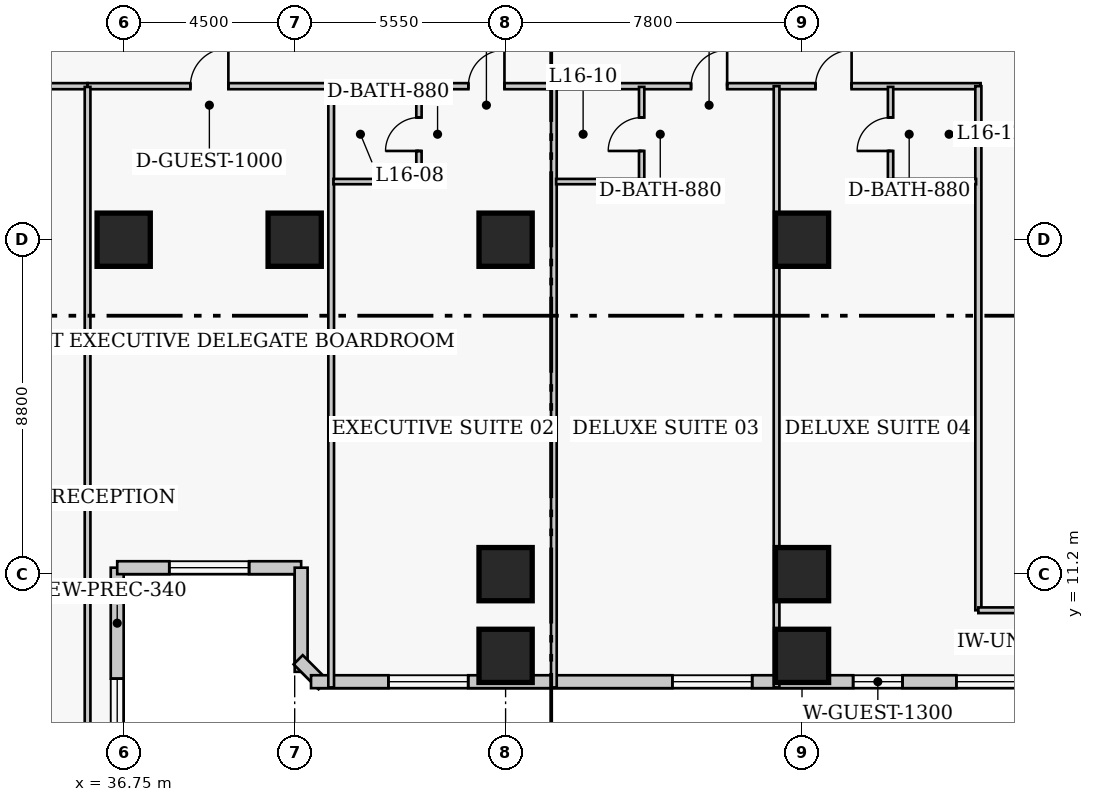
"""IFC4 building model, lengths in metres.
Left out: names, types, materials, properties, quantities, classifications, styles, units other than length and angle.
Written with IfcOpenShell. Run it as: python <this file> out.ifc"""

import sys

from ifc_helpers import new_model, si_unit, direction, frame, frame_2d, origin, origin_2d, place, context, subcontext, project, spatial, rectangle, extrude, element, fill, save


model = new_model("IFC4")
c1 = context("Model", 3, precision=1e-05, world=origin(), true_north=direction((0.0, 1.0)))
c2 = subcontext(c1, "Body", "Model", "MODEL_VIEW")
j1 = project(units=[si_unit("LENGTHUNIT", "METRE"), si_unit("PLANEANGLEUNIT", "RADIAN")], contexts=[c1])
p1 = place(None, origin())
s1 = spatial("IfcSite", under=j1, at=p1, CompositionType="ELEMENT")
p2 = place(p1, origin())
s2 = spatial("IfcBuilding", under=s1, at=p2, CompositionType="ELEMENT")
p3 = place(p2, frame((0.0, 0.0, 67.8)))
s3 = spatial("IfcBuildingStorey", under=s2, at=p3, CompositionType="ELEMENT", Elevation=67.8)
for number, where, z_axis, x_axis in (
    (1, (36.75, 20.0, 0.0), (0.0, 0.0, 1.0), (1.0, 0.0, 0.0)),
    (2, (41.25, 20.0, 0.0), (0.0, 0.0, 1.0), (1.0, 0.0, 0.0)),
    (3, (46.8, 11.2, 0.0), (0.0, 0.0, 1.0), (1.0, 0.0, 0.0)),
    (4, (46.8, 20.0, 0.0), (0.0, 0.0, 1.0), (1.0, 0.0, 0.0)),
    (5, (54.6, 11.2, 0.0), (0.0, 0.0, 1.0), (1.0, 0.0, 0.0)),
    (6, (54.6, 20.0, 0.0), (0.0, 0.0, 1.0), (1.0, 0.0, 0.0)),
    (7, (46.8, 9.05, 0.0), (0.0, 0.0, 1.0), (1.0, 0.0, 0.0)),
    (8, (54.6, 9.05, 0.0), (0.0, 0.0, 1.0), (1.0, 0.0, 0.0)),
):
    element("IfcColumn", number, at=place(p3, frame(where, z_axis=z_axis, x_axis=x_axis)), inside=s3, PredefinedType="COLUMN", context=c2, shape_type="SweptSolid", body=[
        extrude(rectangle(XDim=1.4, YDim=1.4, at=origin_2d()), origin(), (0.0, 0.0, 1.0), 3.8),
    ])
p4 = place(p3, frame((36.58, 3.43, 0.0), z_axis=(0.0, 0.0, 1.0), x_axis=(0.0, 1.0, 0.0)))
e9 = element("IfcWall", 9, at=p4, inside=s3, PredefinedType="SOLIDWALL", context=c2, shape_type="SweptSolid", body=[
    extrude(rectangle(XDim=7.94, YDim=0.34, at=frame_2d((3.97, 0.0))), origin(), (0.0, 0.0, 1.0), 3.54),
])
p5 = place(p4, frame((2.92, 0.0, 0.85)))
e10 = element("IfcOpeningElement", 10, at=p5, cuts=e9, PredefinedType="OPENING", context=c2, shape_type="SweptSolid", body=[
    extrude(rectangle(XDim=2.1, YDim=1.85, at=frame_2d((1.05, 0.925))), frame((0.0, 0.18, 0.0), z_axis=(0.0, -1.0, 0.0), x_axis=(1.0, 0.0, 0.0)), (0.0, 0.0, 1.0), 0.36),
])
p6 = place(p3, frame((36.58, 11.37, 0.0), z_axis=(0.0, 0.0, 1.0), x_axis=(1.0, 0.0, 0.0)))
e11 = element("IfcWall", 11, at=p6, inside=s3, PredefinedType="SOLIDWALL", context=c2, shape_type="SweptSolid", body=[
    extrude(rectangle(XDim=4.84, YDim=0.34, at=frame_2d((2.42, 0.0))), origin(), (0.0, 0.0, 1.0), 3.54),
])
p7 = place(p6, frame((1.37, 0.0, 0.85)))
e12 = element("IfcOpeningElement", 12, at=p7, cuts=e11, PredefinedType="OPENING", context=c2, shape_type="SweptSolid", body=[
    extrude(rectangle(XDim=2.1, YDim=1.85, at=frame_2d((1.05, 0.925))), frame((0.0, 0.18, 0.0), z_axis=(0.0, -1.0, 0.0), x_axis=(1.0, 0.0, 0.0)), (0.0, 0.0, 1.0), 0.36),
])
p8 = place(p3, frame((41.42, 11.37, 0.0), z_axis=(0.0, 0.0, 1.0), x_axis=(0.0, -1.0, 0.0)))
e13 = element("IfcWall", 13, at=p8, inside=s3, PredefinedType="SOLIDWALL", context=c2, shape_type="SweptSolid", body=[
    extrude(rectangle(XDim=2.74, YDim=0.34, at=frame_2d((1.37, 0.0))), origin(), (0.0, 0.0, 1.0), 3.54),
])
p9 = place(p3, frame((41.342, 8.948, 0.0), z_axis=(0.0, 0.0, 1.0), x_axis=(0.707238225886, -0.706975312048, 0.0)))
e14 = element("IfcWall", 14, at=p9, inside=s3, PredefinedType="SOLIDWALL", context=c2, shape_type="SweptSolid", body=[
    extrude(rectangle(XDim=0.929, YDim=0.34, at=frame_2d((0.464, 0.0))), origin(), (0.0, 0.0, 1.0), 3.54),
])
p10 = place(p3, frame((41.68, 8.37, 0.0), z_axis=(0.0, 0.0, 1.0), x_axis=(1.0, 0.0, 0.0)))
e15 = element("IfcWall", 15, at=p10, inside=s3, PredefinedType="SOLIDWALL", context=c2, shape_type="SweptSolid", body=[
    extrude(rectangle(XDim=29.89, YDim=0.34, at=frame_2d((14.945, 0.0))), origin(), (0.0, 0.0, 1.0), 3.54),
])
p11 = place(p10, frame((2.036, 0.0, 0.85)))
e16 = element("IfcOpeningElement", 16, at=p11, cuts=e15, PredefinedType="OPENING", context=c2, shape_type="SweptSolid", body=[
    extrude(rectangle(XDim=2.1, YDim=1.85, at=frame_2d((1.05, 0.925))), frame((0.0, 0.18, 0.0), z_axis=(0.0, -1.0, 0.0), x_axis=(1.0, 0.0, 0.0)), (0.0, 0.0, 1.0), 0.36),
])
p12 = place(p10, frame((9.509, 0.0, 0.85)))
e17 = element("IfcOpeningElement", 17, at=p12, cuts=e15, PredefinedType="OPENING", context=c2, shape_type="SweptSolid", body=[
    extrude(rectangle(XDim=2.1, YDim=1.85, at=frame_2d((1.05, 0.925))), frame((0.0, 0.18, 0.0), z_axis=(0.0, -1.0, 0.0), x_axis=(1.0, 0.0, 0.0)), (0.0, 0.0, 1.0), 0.36),
])
p13 = place(p10, frame((16.981, 0.0, 0.85)))
e18 = element("IfcOpeningElement", 18, at=p13, cuts=e15, PredefinedType="OPENING", context=c2, shape_type="SweptSolid", body=[
    extrude(rectangle(XDim=2.1, YDim=1.85, at=frame_2d((1.05, 0.925))), frame((0.0, 0.18, 0.0), z_axis=(0.0, -1.0, 0.0), x_axis=(1.0, 0.0, 0.0)), (0.0, 0.0, 1.0), 0.36),
])
p14 = place(p10, frame((26.254, 0.0, 0.85)))
e19 = element("IfcOpeningElement", 19, at=p14, cuts=e15, PredefinedType="OPENING", context=c2, shape_type="SweptSolid", body=[
    extrude(rectangle(XDim=2.1, YDim=1.85, at=frame_2d((1.05, 0.925))), frame((0.0, 0.18, 0.0), z_axis=(0.0, -1.0, 0.0), x_axis=(1.0, 0.0, 0.0)), (0.0, 0.0, 1.0), 0.36),
])
p15 = place(p10, frame((14.265, 0.0, 0.85)))
e20 = element("IfcOpeningElement", 20, at=p15, cuts=e15, PredefinedType="OPENING", context=c2, shape_type="SweptSolid", body=[
    extrude(rectangle(XDim=1.3, YDim=1.7, at=frame_2d((0.65, 0.85))), frame((0.0, 0.18, 0.0), z_axis=(0.0, -1.0, 0.0), x_axis=(1.0, 0.0, 0.0)), (0.0, 0.0, 1.0), 0.36),
])
p16 = place(p3, frame((20.4, 24.04, 0.0), z_axis=(0.0, 0.0, 1.0), x_axis=(1.0, 0.0, 0.0)))
e21 = element("IfcWall", 21, at=p16, inside=s3, PredefinedType="PARTITIONING", context=c2, shape_type="SweptSolid", body=[
    extrude(rectangle(XDim=15.4, YDim=0.16, at=frame_2d((7.7, 0.0))), origin(), (0.0, 0.0, 1.0), 3.54),
])
p17 = place(p16, frame((1.99, 0.0, 0.0)))
e22 = element("IfcOpeningElement", 22, at=p17, cuts=e21, PredefinedType="OPENING", context=c2, shape_type="SweptSolid", body=[
    extrude(rectangle(XDim=0.95, YDim=2.1, at=frame_2d((0.475, 1.05))), frame((0.0, 0.09, 0.0), z_axis=(0.0, -1.0, 0.0), x_axis=(1.0, 0.0, 0.0)), (0.0, 0.0, 1.0), 0.18),
])
p18 = place(p16, frame((10.79, 0.0, 0.0)))
e23 = element("IfcOpeningElement", 23, at=p18, cuts=e21, PredefinedType="OPENING", context=c2, shape_type="SweptSolid", body=[
    extrude(rectangle(XDim=1.0, YDim=2.15, at=frame_2d((0.5, 1.075))), frame((0.0, 0.09, 0.0), z_axis=(0.0, -1.0, 0.0), x_axis=(1.0, 0.0, 0.0)), (0.0, 0.0, 1.0), 0.18),
])
p19 = place(p3, frame((35.8, 24.04, 0.0), z_axis=(0.0, 0.0, 1.0), x_axis=(1.0, 0.0, 0.0)))
e24 = element("IfcWall", 24, at=p19, inside=s3, PredefinedType="PARTITIONING", context=c2, shape_type="SweptSolid", body=[
    extrude(rectangle(XDim=23.5, YDim=0.16, at=frame_2d((11.75, 0.0))), origin(), (0.0, 0.0, 1.0), 3.54),
])
p20 = place(p19, frame((2.705, 0.0, 0.0)))
e25 = element("IfcOpeningElement", 25, at=p20, cuts=e24, PredefinedType="OPENING", context=c2, shape_type="SweptSolid", body=[
    extrude(rectangle(XDim=1.0, YDim=2.15, at=frame_2d((0.5, 1.075))), frame((0.0, 0.09, 0.0), z_axis=(0.0, -1.0, 0.0), x_axis=(1.0, 0.0, 0.0)), (0.0, 0.0, 1.0), 0.18),
])
p21 = place(p19, frame((10.02, 0.0, 0.0)))
e26 = element("IfcOpeningElement", 26, at=p21, cuts=e24, PredefinedType="OPENING", context=c2, shape_type="SweptSolid", body=[
    extrude(rectangle(XDim=0.95, YDim=2.1, at=frame_2d((0.475, 1.05))), frame((0.0, 0.09, 0.0), z_axis=(0.0, -1.0, 0.0), x_axis=(1.0, 0.0, 0.0)), (0.0, 0.0, 1.0), 0.18),
])
p22 = place(p19, frame((15.88, 0.0, 0.0)))
e27 = element("IfcOpeningElement", 27, at=p22, cuts=e24, PredefinedType="OPENING", context=c2, shape_type="SweptSolid", body=[
    extrude(rectangle(XDim=0.95, YDim=2.1, at=frame_2d((0.475, 1.05))), frame((0.0, 0.09, 0.0), z_axis=(0.0, -1.0, 0.0), x_axis=(1.0, 0.0, 0.0)), (0.0, 0.0, 1.0), 0.18),
])
p23 = place(p19, frame((19.155, 0.0, 0.0)))
e28 = element("IfcOpeningElement", 28, at=p23, cuts=e24, PredefinedType="OPENING", context=c2, shape_type="SweptSolid", body=[
    extrude(rectangle(XDim=0.95, YDim=2.1, at=frame_2d((0.475, 1.05))), frame((0.0, 0.09, 0.0), z_axis=(0.0, -1.0, 0.0), x_axis=(1.0, 0.0, 0.0)), (0.0, 0.0, 1.0), 0.18),
])
p24 = place(p3, frame((59.24, 10.25, 0.0), z_axis=(0.0, 0.0, 1.0), x_axis=(0.0, 1.0, 0.0)))
e29 = element("IfcWall", 29, at=p24, inside=s3, PredefinedType="PARTITIONING", context=c2, shape_type="SweptSolid", body=[
    extrude(rectangle(XDim=13.79, YDim=0.16, at=frame_2d((6.895, 0.0))), origin(), (0.0, 0.0, 1.0), 3.54),
])
p25 = place(p3, frame((59.24, 10.25, 0.0), z_axis=(0.0, 0.0, 1.0), x_axis=(1.0, 0.0, 0.0)))
e30 = element("IfcWall", 30, at=p25, inside=s3, PredefinedType="PARTITIONING", context=c2, shape_type="SweptSolid", body=[
    extrude(rectangle(XDim=2.22, YDim=0.15, at=frame_2d((1.11, 0.0))), origin(), (0.0, 0.0, 1.0), 3.54),
])
p26 = place(p3, frame((35.8, 3.02, 0.0), z_axis=(0.0, 0.0, 1.0), x_axis=(0.0, 1.0, 0.0)))
e31 = element("IfcWall", 31, at=p26, inside=s3, PredefinedType="PARTITIONING", context=c2, shape_type="SweptSolid", body=[
    extrude(rectangle(XDim=21.0, YDim=0.15, at=frame_2d((10.5, 0.0))), origin(), (0.0, 0.0, 1.0), 3.54),
])
p27 = place(p3, frame((42.21, 8.22, 0.0), z_axis=(0.0, 0.0, 1.0), x_axis=(0.0, 1.0, 0.0)))
e32 = element("IfcWall", 32, at=p27, inside=s3, PredefinedType="PARTITIONING", context=c2, shape_type="SweptSolid", body=[
    extrude(rectangle(XDim=15.82, YDim=0.15, at=frame_2d((7.91, 0.0))), origin(), (0.0, 0.0, 1.0), 3.54),
])
p28 = place(p3, frame((44.52, 21.53, 0.0), z_axis=(0.0, 0.0, 1.0), x_axis=(0.0, 1.0, 0.0)))
e33 = element("IfcWall", 33, at=p28, inside=s3, PredefinedType="PLUMBINGWALL", context=c2, shape_type="SweptSolid", body=[
    extrude(rectangle(XDim=2.49, YDim=0.14, at=frame_2d((1.245, 0.0))), origin(), (0.0, 0.0, 1.0), 3.54),
])
p29 = place(p28, frame((0.805, 0.0, 0.0)))
e34 = element("IfcOpeningElement", 34, at=p29, cuts=e33, PredefinedType="OPENING", context=c2, shape_type="SweptSolid", body=[
    extrude(rectangle(XDim=0.88, YDim=2.05, at=frame_2d((0.44, 1.025))), frame((0.0, 0.08, 0.0), z_axis=(0.0, -1.0, 0.0), x_axis=(1.0, 0.0, 0.0)), (0.0, 0.0, 1.0), 0.16),
])
p30 = place(p3, frame((42.27, 21.53, 0.0), z_axis=(0.0, 0.0, 1.0), x_axis=(1.0, 0.0, 0.0)))
e35 = element("IfcWall", 35, at=p30, inside=s3, PredefinedType="PLUMBINGWALL", context=c2, shape_type="SweptSolid", body=[
    extrude(rectangle(XDim=2.25, YDim=0.14, at=frame_2d((1.125, 0.0))), origin(), (0.0, 0.0, 1.0), 3.54),
])
p31 = place(p3, frame((48.07, 8.22, 0.0), z_axis=(0.0, 0.0, 1.0), x_axis=(0.0, 1.0, 0.0)))
e36 = element("IfcWall", 36, at=p31, inside=s3, PredefinedType="PARTITIONING", context=c2, shape_type="SweptSolid", body=[
    extrude(rectangle(XDim=15.82, YDim=0.15, at=frame_2d((7.91, 0.0))), origin(), (0.0, 0.0, 1.0), 3.54),
])
p32 = place(p3, frame((50.38, 21.53, 0.0), z_axis=(0.0, 0.0, 1.0), x_axis=(0.0, 1.0, 0.0)))
e37 = element("IfcWall", 37, at=p32, inside=s3, PredefinedType="PLUMBINGWALL", context=c2, shape_type="SweptSolid", body=[
    extrude(rectangle(XDim=2.49, YDim=0.14, at=frame_2d((1.245, 0.0))), origin(), (0.0, 0.0, 1.0), 3.54),
])
p33 = place(p32, frame((0.805, 0.0, 0.0)))
e38 = element("IfcOpeningElement", 38, at=p33, cuts=e37, PredefinedType="OPENING", context=c2, shape_type="SweptSolid", body=[
    extrude(rectangle(XDim=0.88, YDim=2.05, at=frame_2d((0.44, 1.025))), frame((0.0, 0.08, 0.0), z_axis=(0.0, -1.0, 0.0), x_axis=(1.0, 0.0, 0.0)), (0.0, 0.0, 1.0), 0.16),
])
p34 = place(p3, frame((48.13, 21.53, 0.0), z_axis=(0.0, 0.0, 1.0), x_axis=(1.0, 0.0, 0.0)))
e39 = element("IfcWall", 39, at=p34, inside=s3, PredefinedType="PLUMBINGWALL", context=c2, shape_type="SweptSolid", body=[
    extrude(rectangle(XDim=2.25, YDim=0.14, at=frame_2d((1.125, 0.0))), origin(), (0.0, 0.0, 1.0), 3.54),
])
p35 = place(p3, frame((53.93, 8.22, 0.0), z_axis=(0.0, 0.0, 1.0), x_axis=(0.0, 1.0, 0.0)))
e40 = element("IfcWall", 40, at=p35, inside=s3, PredefinedType="PARTITIONING", context=c2, shape_type="SweptSolid", body=[
    extrude(rectangle(XDim=15.82, YDim=0.15, at=frame_2d((7.91, 0.0))), origin(), (0.0, 0.0, 1.0), 3.54),
])
p36 = place(p3, frame((56.93, 21.53, 0.0), z_axis=(0.0, 0.0, 1.0), x_axis=(0.0, 1.0, 0.0)))
e41 = element("IfcWall", 41, at=p36, inside=s3, PredefinedType="PLUMBINGWALL", context=c2, shape_type="SweptSolid", body=[
    extrude(rectangle(XDim=2.49, YDim=0.14, at=frame_2d((1.245, 0.0))), origin(), (0.0, 0.0, 1.0), 3.54),
])
p37 = place(p36, frame((0.805, 0.0, 0.0)))
e42 = element("IfcOpeningElement", 42, at=p37, cuts=e41, PredefinedType="OPENING", context=c2, shape_type="SweptSolid", body=[
    extrude(rectangle(XDim=0.88, YDim=2.05, at=frame_2d((0.44, 1.025))), frame((0.0, 0.08, 0.0), z_axis=(0.0, -1.0, 0.0), x_axis=(1.0, 0.0, 0.0)), (0.0, 0.0, 1.0), 0.16),
])
p38 = place(p3, frame((56.93, 21.53, 0.0), z_axis=(0.0, 0.0, 1.0), x_axis=(1.0, 0.0, 0.0)))
e43 = element("IfcWall", 43, at=p38, inside=s3, PredefinedType="PLUMBINGWALL", context=c2, shape_type="SweptSolid", body=[
    extrude(rectangle(XDim=2.25, YDim=0.14, at=frame_2d((1.125, 0.0))), origin(), (0.0, 0.0, 1.0), 3.54),
])
p39 = place(p5, origin())
e44 = element("IfcWindow", 44, at=p39, inside=s3, PartitioningType="SINGLE_PANEL", PredefinedType="WINDOW", context=c2, shape_type="SweptSolid", body=[
    extrude(rectangle(XDim=2.1, YDim=1.85, at=frame_2d((1.05, 0.925))), frame((0.0, 0.03, 0.0), z_axis=(0.0, -1.0, 0.0), x_axis=(1.0, 0.0, 0.0)), (0.0, 0.0, 1.0), 0.06),
])
fill(e10, e44)
p40 = place(p7, origin())
e45 = element("IfcWindow", 45, at=p40, inside=s3, PartitioningType="SINGLE_PANEL", PredefinedType="WINDOW", context=c2, shape_type="SweptSolid", body=[
    extrude(rectangle(XDim=2.1, YDim=1.85, at=frame_2d((1.05, 0.925))), frame((0.0, 0.03, 0.0), z_axis=(0.0, -1.0, 0.0), x_axis=(1.0, 0.0, 0.0)), (0.0, 0.0, 1.0), 0.06),
])
fill(e12, e45)
p41 = place(p11, origin())
e46 = element("IfcWindow", 46, at=p41, inside=s3, PartitioningType="SINGLE_PANEL", PredefinedType="WINDOW", context=c2, shape_type="SweptSolid", body=[
    extrude(rectangle(XDim=2.1, YDim=1.85, at=frame_2d((1.05, 0.925))), frame((0.0, 0.03, 0.0), z_axis=(0.0, -1.0, 0.0), x_axis=(1.0, 0.0, 0.0)), (0.0, 0.0, 1.0), 0.06),
])
fill(e16, e46)
p42 = place(p12, origin())
e47 = element("IfcWindow", 47, at=p42, inside=s3, PartitioningType="SINGLE_PANEL", PredefinedType="WINDOW", context=c2, shape_type="SweptSolid", body=[
    extrude(rectangle(XDim=2.1, YDim=1.85, at=frame_2d((1.05, 0.925))), frame((0.0, 0.03, 0.0), z_axis=(0.0, -1.0, 0.0), x_axis=(1.0, 0.0, 0.0)), (0.0, 0.0, 1.0), 0.06),
])
fill(e17, e47)
p43 = place(p13, origin())
e48 = element("IfcWindow", 48, at=p43, inside=s3, PartitioningType="SINGLE_PANEL", PredefinedType="WINDOW", context=c2, shape_type="SweptSolid", body=[
    extrude(rectangle(XDim=2.1, YDim=1.85, at=frame_2d((1.05, 0.925))), frame((0.0, 0.03, 0.0), z_axis=(0.0, -1.0, 0.0), x_axis=(1.0, 0.0, 0.0)), (0.0, 0.0, 1.0), 0.06),
])
fill(e18, e48)
p44 = place(p15, origin())
e49 = element("IfcWindow", 49, at=p44, inside=s3, PartitioningType="SINGLE_PANEL", PredefinedType="WINDOW", context=c2, shape_type="SweptSolid", body=[
    extrude(rectangle(XDim=1.3, YDim=1.7, at=frame_2d((0.65, 0.85))), frame((0.0, 0.03, 0.0), z_axis=(0.0, -1.0, 0.0), x_axis=(1.0, 0.0, 0.0)), (0.0, 0.0, 1.0), 0.06),
])
fill(e20, e49)
p45 = place(p20, origin())
e50 = element("IfcDoor", 50, at=p45, inside=s3, OperationType="SINGLE_SWING_RIGHT", PredefinedType="DOOR", context=c2, shape_type="SweptSolid", body=[
    extrude(rectangle(XDim=1.0, YDim=2.15, at=frame_2d((0.5, 1.075))), frame((0.0, 0.025, 0.0), z_axis=(0.0, -1.0, 0.0), x_axis=(1.0, 0.0, 0.0)), (0.0, 0.0, 1.0), 0.05),
])
fill(e25, e50)
p46 = place(p29, origin())
e51 = element("IfcDoor", 51, at=p46, inside=s3, OperationType="SINGLE_SWING_LEFT", PredefinedType="DOOR", context=c2, shape_type="SweptSolid", body=[
    extrude(rectangle(XDim=0.88, YDim=2.05, at=frame_2d((0.44, 1.025))), frame((0.0, 0.025, 0.0), z_axis=(0.0, -1.0, 0.0), x_axis=(1.0, 0.0, 0.0)), (0.0, 0.0, 1.0), 0.05),
])
fill(e34, e51)
p47 = place(p21, origin())
e52 = element("IfcDoor", 52, at=p47, inside=s3, OperationType="SINGLE_SWING_RIGHT", PredefinedType="DOOR", context=c2, shape_type="SweptSolid", body=[
    extrude(rectangle(XDim=0.95, YDim=2.1, at=frame_2d((0.475, 1.05))), frame((0.0, 0.025, 0.0), z_axis=(0.0, -1.0, 0.0), x_axis=(1.0, 0.0, 0.0)), (0.0, 0.0, 1.0), 0.05),
])
fill(e26, e52)
p48 = place(p33, origin())
e53 = element("IfcDoor", 53, at=p48, inside=s3, OperationType="SINGLE_SWING_LEFT", PredefinedType="DOOR", context=c2, shape_type="SweptSolid", body=[
    extrude(rectangle(XDim=0.88, YDim=2.05, at=frame_2d((0.44, 1.025))), frame((0.0, 0.025, 0.0), z_axis=(0.0, -1.0, 0.0), x_axis=(1.0, 0.0, 0.0)), (0.0, 0.0, 1.0), 0.05),
])
fill(e38, e53)
p49 = place(p22, origin())
e54 = element("IfcDoor", 54, at=p49, inside=s3, OperationType="SINGLE_SWING_RIGHT", PredefinedType="DOOR", context=c2, shape_type="SweptSolid", body=[
    extrude(rectangle(XDim=0.95, YDim=2.1, at=frame_2d((0.475, 1.05))), frame((0.0, 0.025, 0.0), z_axis=(0.0, -1.0, 0.0), x_axis=(1.0, 0.0, 0.0)), (0.0, 0.0, 1.0), 0.05),
])
fill(e27, e54)
p50 = place(p37, origin())
e55 = element("IfcDoor", 55, at=p50, inside=s3, OperationType="SINGLE_SWING_LEFT", PredefinedType="DOOR", context=c2, shape_type="SweptSolid", body=[
    extrude(rectangle(XDim=0.88, YDim=2.05, at=frame_2d((0.44, 1.025))), frame((0.0, 0.025, 0.0), z_axis=(0.0, -1.0, 0.0), x_axis=(1.0, 0.0, 0.0)), (0.0, 0.0, 1.0), 0.05),
])
fill(e42, e55)
p51 = place(p23, origin())
e56 = element("IfcDoor", 56, at=p51, inside=s3, OperationType="SINGLE_SWING_RIGHT", PredefinedType="DOOR", context=c2, shape_type="SweptSolid", body=[
    extrude(rectangle(XDim=0.95, YDim=2.1, at=frame_2d((0.475, 1.05))), frame((0.0, 0.025, 0.0), z_axis=(0.0, -1.0, 0.0), x_axis=(1.0, 0.0, 0.0)), (0.0, 0.0, 1.0), 0.05),
])
fill(e28, e56)
save(model, sys.argv[1])
